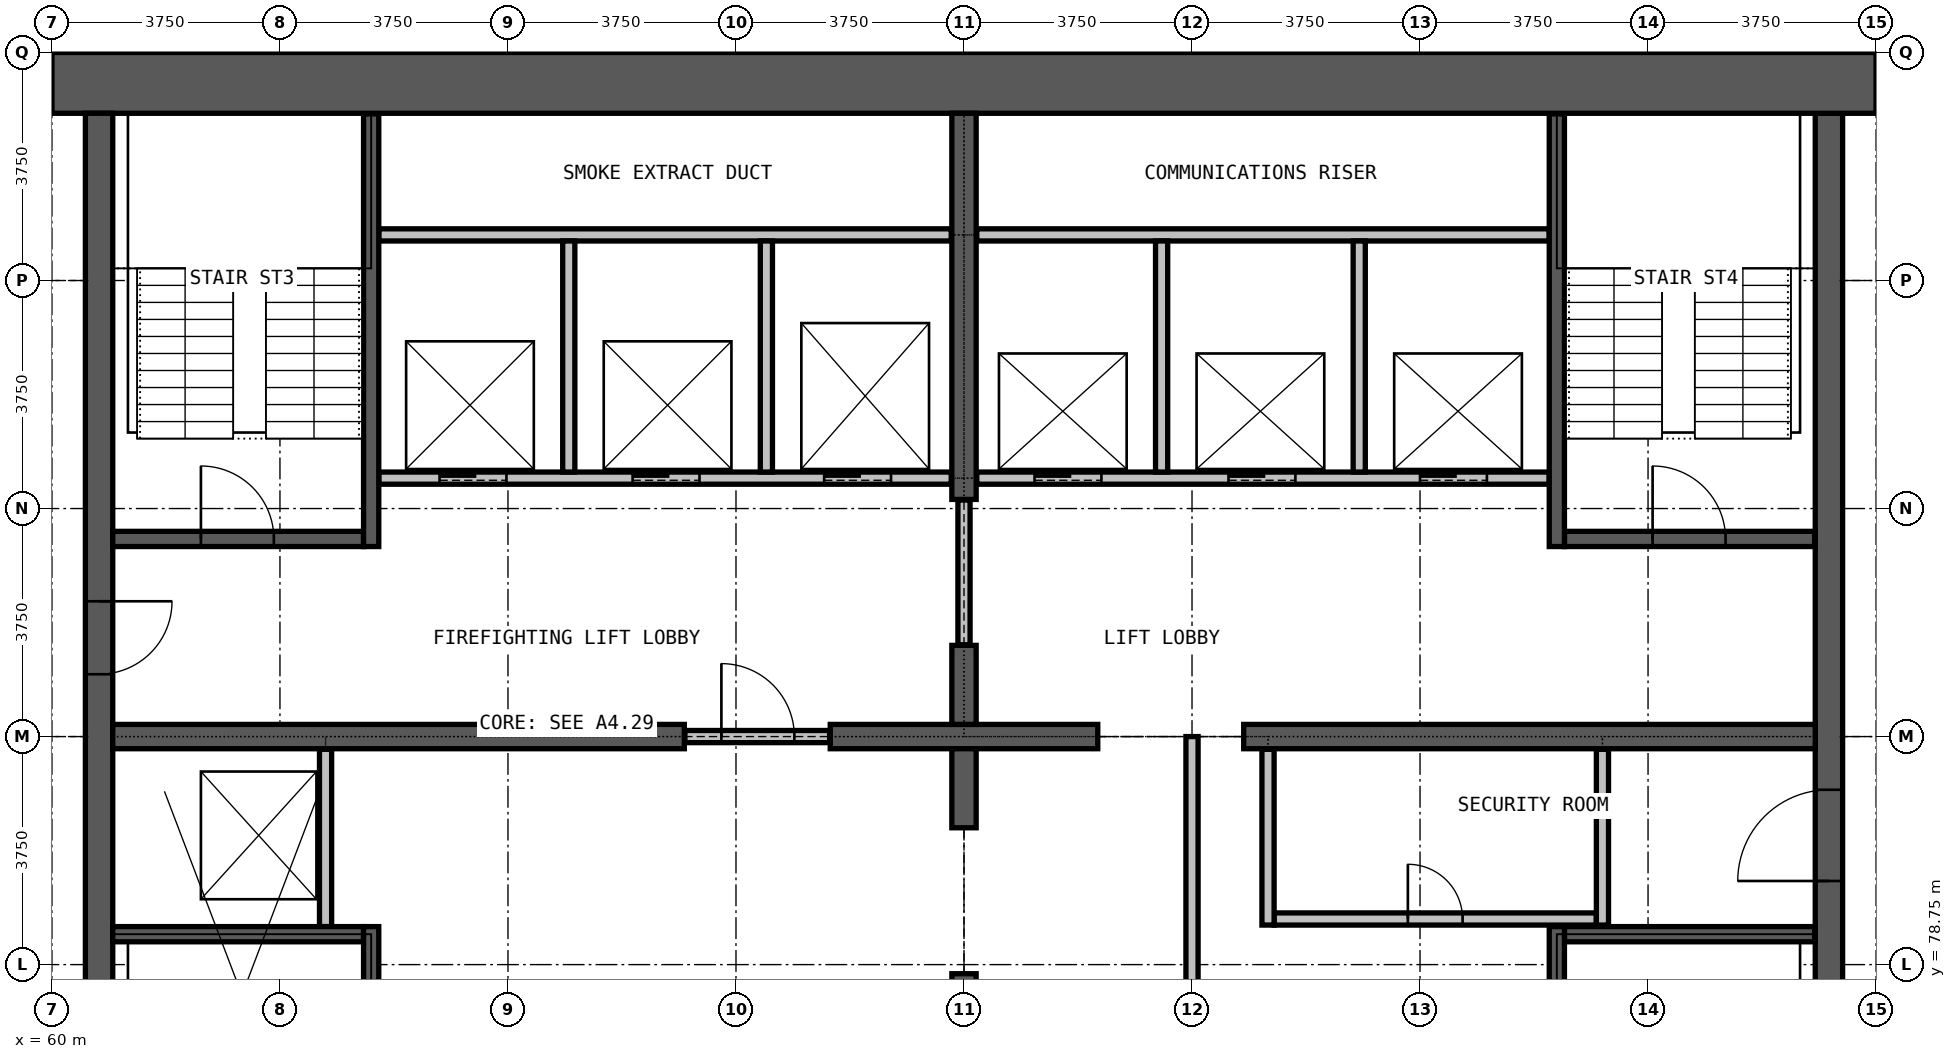
"""IFC4 building model, lengths in metres.
Left out: names, types, materials, properties, quantities, classifications, styles, units other than length and angle.
Written with IfcOpenShell. Run it as: python <this file> out.ifc"""

import sys

from ifc_helpers import new_model, si_unit, direction, frame, frame_2d, origin, place, context, subcontext, project, spatial, rectangle, extrude, element, fill, save


model = new_model("IFC4")
c1 = context("Model", 3, precision=1e-05, world=origin(), true_north=direction((0.0, 1.0)))
c2 = subcontext(c1, "Body", "Model", "MODEL_VIEW")
j1 = project(units=[si_unit("LENGTHUNIT", "METRE"), si_unit("PLANEANGLEUNIT", "RADIAN")], contexts=[c1])
p1 = place(None, origin())
s1 = spatial("IfcSite", under=j1, at=p1, CompositionType="ELEMENT")
p2 = place(p1, origin())
s2 = spatial("IfcBuilding", under=s1, at=p2, CompositionType="ELEMENT")
p3 = place(p2, frame((0.0, 0.0, 272.9)))
s3 = spatial("IfcBuildingStorey", under=s2, at=p3, CompositionType="ELEMENT", Elevation=272.9)
p4 = place(p3, frame((89.225, 72.25, 0.0), z_axis=(0.0, 0.0, 1.0), x_axis=(0.0, 1.0, 0.0)))
e1 = element("IfcWall", 1, at=p4, inside=s3, PredefinedType="SHEAR", context=c2, shape_type="SweptSolid", body=[
    extrude(rectangle(XDim=20.5, YDim=0.45, at=frame_2d((10.25, 0.0))), origin(), (0.0, 0.0, 1.0), 3.6),
])
p5 = place(p4, frame((7.875, 0.0, 0.0)))
e2 = element("IfcOpeningElement", 2, at=p5, cuts=e1, PredefinedType="OPENING", context=c2, shape_type="SweptSolid", body=[
    extrude(rectangle(XDim=1.5, YDim=2.2, at=frame_2d((0.75, 1.1))), frame((0.0, 0.235, 0.0), z_axis=(0.0, -1.0, 0.0), x_axis=(1.0, 0.0, 0.0)), (0.0, 0.0, 1.0), 0.47),
])
p6 = place(p3, frame((90.0, 93.25, 0.0), z_axis=(0.0, 0.0, 1.0), x_axis=(-1.0, 0.0, 0.0)))
e3 = element("IfcWall", 3, at=p6, inside=s3, PredefinedType="SHEAR", context=c2, shape_type="SweptSolid", body=[
    extrude(rectangle(XDim=30.0, YDim=1.0, at=frame_2d((15.0, 0.0))), origin(), (0.0, 0.0, 1.0), 3.6),
])
p7 = place(p3, frame((60.775, 92.75, 0.0), z_axis=(0.0, 0.0, 1.0), x_axis=(0.0, -1.0, 0.0)))
e4 = element("IfcWall", 4, at=p7, inside=s3, PredefinedType="SHEAR", context=c2, shape_type="SweptSolid", body=[
    extrude(rectangle(XDim=20.5, YDim=0.45, at=frame_2d((10.25, 0.0))), origin(), (0.0, 0.0, 1.0), 3.6),
])
p8 = place(p7, frame((8.025, 0.0, 0.0)))
e5 = element("IfcOpeningElement", 5, at=p8, cuts=e4, PredefinedType="OPENING", context=c2, shape_type="SweptSolid", body=[
    extrude(rectangle(XDim=1.2, YDim=2.2, at=frame_2d((0.6, 1.1))), frame((0.0, 0.235, 0.0), z_axis=(0.0, -1.0, 0.0), x_axis=(1.0, 0.0, 0.0)), (0.0, 0.0, 1.0), 0.47),
])
p9 = place(p3, frame((61.0, 82.5, 0.0), z_axis=(0.0, 0.0, 1.0), x_axis=(1.0, 0.0, 0.0)))
e6 = element("IfcWall", 6, at=p9, inside=s3, PredefinedType="SHEAR", context=c2, shape_type="SweptSolid", body=[
    extrude(rectangle(XDim=9.4, YDim=0.4, at=frame_2d((4.7, 0.0))), origin(), (0.0, 0.0, 1.0), 3.6),
])
p10 = place(p3, frame((72.8, 82.5, 0.0), z_axis=(0.0, 0.0, 1.0), x_axis=(1.0, 0.0, 0.0)))
e7 = element("IfcWall", 7, at=p10, inside=s3, PredefinedType="SHEAR", context=c2, shape_type="SweptSolid", body=[
    extrude(rectangle(XDim=4.4, YDim=0.4, at=frame_2d((2.2, 0.0))), origin(), (0.0, 0.0, 1.0), 3.6),
])
p11 = place(p3, frame((79.6, 82.5, 0.0), z_axis=(0.0, 0.0, 1.0), x_axis=(1.0, 0.0, 0.0)))
e8 = element("IfcWall", 8, at=p11, inside=s3, PredefinedType="SHEAR", context=c2, shape_type="SweptSolid", body=[
    extrude(rectangle(XDim=9.4, YDim=0.4, at=frame_2d((4.7, 0.0))), origin(), (0.0, 0.0, 1.0), 3.6),
])
p12 = place(p3, frame((75.0, 72.25, 0.0), z_axis=(0.0, 0.0, 1.0), x_axis=(0.0, 1.0, 0.0)))
e9 = element("IfcWall", 9, at=p12, inside=s3, PredefinedType="SHEAR", context=c2, shape_type="SweptSolid", body=[
    extrude(rectangle(XDim=6.35, YDim=0.4, at=frame_2d((3.175, 0.0))), origin(), (0.0, 0.0, 1.0), 3.6),
])
for number, where, z_axis, x_axis in (
    (10, (75.0, 81.0, 0.0), (0.0, 0.0, 1.0), (0.0, 1.0, 0.0)),
    (11, (75.0, 82.7, 0.0), (0.0, 0.0, 1.0), (0.0, 1.0, 0.0)),
):
    element("IfcWall", number, at=place(p3, frame(where, z_axis=z_axis, x_axis=x_axis)), inside=s3, PredefinedType="SHEAR", context=c2, shape_type="SweptSolid", body=[
        extrude(rectangle(XDim=1.3, YDim=0.4, at=frame_2d((0.65, 0.0))), origin(), (0.0, 0.0, 1.0), 3.6),
    ])
p13 = place(p3, frame((75.0, 86.4, 0.0), z_axis=(0.0, 0.0, 1.0), x_axis=(0.0, 1.0, 0.0)))
e12 = element("IfcWall", 12, at=p13, inside=s3, PredefinedType="SHEAR", context=c2, shape_type="SweptSolid", body=[
    extrude(rectangle(XDim=6.35, YDim=0.4, at=frame_2d((3.175, 0.0))), origin(), (0.0, 0.0, 1.0), 3.6),
])
p14 = place(p3, frame((80.1, 79.5, 0.0), z_axis=(0.0, 0.0, 1.0), x_axis=(1.0, 0.0, 0.0)))
e13 = element("IfcWall", 13, at=p14, inside=s3, PredefinedType="PARTITIONING", context=c2, shape_type="SweptSolid", body=[
    extrude(rectangle(XDim=5.3, YDim=0.2, at=frame_2d((2.65, 0.0))), origin(), (0.0, 0.0, 1.0), 3.3),
])
p15 = place(p14, frame((2.2, 0.0, 0.0)))
e14 = element("IfcOpeningElement", 14, at=p15, cuts=e13, PredefinedType="OPENING", context=c2, shape_type="SweptSolid", body=[
    extrude(rectangle(XDim=0.9, YDim=2.2, at=frame_2d((0.45, 1.1))), frame((0.0, 0.11, 0.0), z_axis=(0.0, -1.0, 0.0), x_axis=(1.0, 0.0, 0.0)), (0.0, 0.0, 1.0), 0.22),
])
p16 = place(p3, frame((70.41, 82.5, 0.0), z_axis=(0.0, 0.0, 1.0), x_axis=(1.0, 0.0, 0.0)))
e15 = element("IfcWall", 15, at=p16, inside=s3, PredefinedType="PARTITIONING", context=c2, shape_type="SweptSolid", body=[
    extrude(rectangle(XDim=2.38, YDim=0.2, at=frame_2d((1.19, 0.0))), origin(), (0.0, 0.0, 1.0), 2.4),
])
p17 = place(p16, frame((0.6, 0.0, 0.0)))
e16 = element("IfcOpeningElement", 16, at=p17, cuts=e15, PredefinedType="OPENING", context=c2, shape_type="SweptSolid", body=[
    extrude(rectangle(XDim=1.2, YDim=2.2, at=frame_2d((0.6, 1.1))), frame((0.0, 0.11, 0.0), z_axis=(0.0, -1.0, 0.0), x_axis=(1.0, 0.0, 0.0)), (0.0, 0.0, 1.0), 0.22),
])
p18 = place(p3, frame((75.0, 84.01, 0.0), z_axis=(0.0, 0.0, 1.0), x_axis=(0.0, 1.0, 0.0)))
e17 = element("IfcWall", 17, at=p18, inside=s3, PredefinedType="PARTITIONING", context=c2, shape_type="SweptSolid", body=[
    extrude(rectangle(XDim=2.38, YDim=0.2, at=frame_2d((1.19, 0.0))), origin(), (0.0, 0.0, 1.0), 2.4),
])
p19 = place(p3, frame((78.75, 72.26, 0.0), z_axis=(0.0, 0.0, 1.0), x_axis=(0.0, 1.0, 0.0)))
e18 = element("IfcWall", 18, at=p19, inside=s3, PredefinedType="PARTITIONING", context=c2, shape_type="SweptSolid", body=[
    extrude(rectangle(XDim=10.24, YDim=0.2, at=frame_2d((5.12, 0.0))), origin(), (0.0, 0.0, 1.0), 3.3),
])
for number, where, z_axis, x_axis in (
    (19, (80.0, 79.4, 0.0), (0.0, 0.0, 1.0), (0.0, 1.0, 0.0)),
    (20, (85.5, 79.4, 0.0), (0.0, 0.0, 1.0), (0.0, 1.0, 0.0)),
):
    element("IfcWall", number, at=place(p3, frame(where, z_axis=z_axis, x_axis=x_axis)), inside=s3, PredefinedType="PARTITIONING", context=c2, shape_type="SweptSolid", body=[
        extrude(rectangle(XDim=2.89, YDim=0.2, at=frame_2d((1.445, 0.0))), origin(), (0.0, 0.0, 1.0), 3.3),
    ])
p20 = place(p3, frame((65.375, 86.75, 0.0), z_axis=(0.0, 0.0, 1.0), x_axis=(1.0, 0.0, 0.0)))
e21 = element("IfcWall", 21, at=p20, inside=s3, PredefinedType="PARTITIONING", context=c2, shape_type="SweptSolid", body=[
    extrude(rectangle(XDim=9.415, YDim=0.2, at=frame_2d((4.708, 0.0))), origin(), (0.0, 0.0, 1.0), 3.3),
])
p21 = place(p20, frame((1.0, 0.0, 0.0)))
e22 = element("IfcOpeningElement", 22, at=p21, cuts=e21, PredefinedType="OPENING", context=c2, shape_type="SweptSolid", body=[
    extrude(rectangle(XDim=1.1, YDim=2.2, at=frame_2d((0.55, 1.1))), frame((0.0, 0.11, 0.0), z_axis=(0.0, -1.0, 0.0), x_axis=(1.0, 0.0, 0.0)), (0.0, 0.0, 1.0), 0.22),
])
p22 = place(p20, frame((4.175, 0.0, 0.0)))
e23 = element("IfcOpeningElement", 23, at=p22, cuts=e21, PredefinedType="OPENING", context=c2, shape_type="SweptSolid", body=[
    extrude(rectangle(XDim=1.1, YDim=2.2, at=frame_2d((0.55, 1.1))), frame((0.0, 0.11, 0.0), z_axis=(0.0, -1.0, 0.0), x_axis=(1.0, 0.0, 0.0)), (0.0, 0.0, 1.0), 0.22),
])
p23 = place(p20, frame((7.325, 0.0, 0.0)))
e24 = element("IfcOpeningElement", 24, at=p23, cuts=e21, PredefinedType="OPENING", context=c2, shape_type="SweptSolid", body=[
    extrude(rectangle(XDim=1.1, YDim=2.2, at=frame_2d((0.55, 1.1))), frame((0.0, 0.11, 0.0), z_axis=(0.0, -1.0, 0.0), x_axis=(1.0, 0.0, 0.0)), (0.0, 0.0, 1.0), 0.22),
])
p24 = place(p3, frame((75.21, 86.75, 0.0), z_axis=(0.0, 0.0, 1.0), x_axis=(1.0, 0.0, 0.0)))
e25 = element("IfcWall", 25, at=p24, inside=s3, PredefinedType="PARTITIONING", context=c2, shape_type="SweptSolid", body=[
    extrude(rectangle(XDim=9.415, YDim=0.2, at=frame_2d((4.708, 0.0))), origin(), (0.0, 0.0, 1.0), 3.3),
])
p25 = place(p24, frame((0.95, 0.0, 0.0)))
e26 = element("IfcOpeningElement", 26, at=p25, cuts=e25, PredefinedType="OPENING", context=c2, shape_type="SweptSolid", body=[
    extrude(rectangle(XDim=1.1, YDim=2.2, at=frame_2d((0.55, 1.1))), frame((0.0, 0.11, 0.0), z_axis=(0.0, -1.0, 0.0), x_axis=(1.0, 0.0, 0.0)), (0.0, 0.0, 1.0), 0.22),
])
p26 = place(p24, frame((4.14, 0.0, 0.0)))
e27 = element("IfcOpeningElement", 27, at=p26, cuts=e25, PredefinedType="OPENING", context=c2, shape_type="SweptSolid", body=[
    extrude(rectangle(XDim=1.1, YDim=2.2, at=frame_2d((0.55, 1.1))), frame((0.0, 0.11, 0.0), z_axis=(0.0, -1.0, 0.0), x_axis=(1.0, 0.0, 0.0)), (0.0, 0.0, 1.0), 0.22),
])
p27 = place(p24, frame((7.29, 0.0, 0.0)))
e28 = element("IfcOpeningElement", 28, at=p27, cuts=e25, PredefinedType="OPENING", context=c2, shape_type="SweptSolid", body=[
    extrude(rectangle(XDim=1.1, YDim=2.2, at=frame_2d((0.55, 1.1))), frame((0.0, 0.11, 0.0), z_axis=(0.0, -1.0, 0.0), x_axis=(1.0, 0.0, 0.0)), (0.0, 0.0, 1.0), 0.22),
])
for number, where, z_axis, x_axis in (
    (29, (65.375, 90.75, 0.0), (0.0, 0.0, 1.0), (1.0, 0.0, 0.0)),
    (30, (75.21, 90.75, 0.0), (0.0, 0.0, 1.0), (1.0, 0.0, 0.0)),
):
    element("IfcWall", number, at=place(p3, frame(where, z_axis=z_axis, x_axis=x_axis)), inside=s3, PredefinedType="PARTITIONING", context=c2, shape_type="SweptSolid", body=[
        extrude(rectangle(XDim=9.415, YDim=0.2, at=frame_2d((4.708, 0.0))), origin(), (0.0, 0.0, 1.0), 3.3),
    ])
p28 = place(p3, frame((64.5, 79.375, 0.0), z_axis=(0.0, 0.0, 1.0), x_axis=(0.0, 1.0, 0.0)))
e31 = element("IfcWall", 31, at=p28, inside=s3, PredefinedType="PARTITIONING", context=c2, shape_type="SweptSolid", body=[
    extrude(rectangle(XDim=2.915, YDim=0.2, at=frame_2d((1.458, 0.0))), origin(), (0.0, 0.0, 1.0), 3.3),
])
for number, where, z_axis, x_axis in (
    (32, (68.5, 86.85, 0.0), (0.0, 0.0, 1.0), (0.0, 1.0, 0.0)),
    (33, (71.75, 86.85, 0.0), (0.0, 0.0, 1.0), (0.0, 1.0, 0.0)),
    (34, (78.25, 86.85, 0.0), (0.0, 0.0, 1.0), (0.0, 1.0, 0.0)),
    (35, (81.5, 86.85, 0.0), (0.0, 0.0, 1.0), (0.0, 1.0, 0.0)),
):
    element("IfcWall", number, at=place(p3, frame(where, z_axis=z_axis, x_axis=x_axis)), inside=s3, PredefinedType="PARTITIONING", context=c2, shape_type="SweptSolid", body=[
        extrude(rectangle(XDim=3.8, YDim=0.2, at=frame_2d((1.9, 0.0))), origin(), (0.0, 0.0, 1.0), 3.3),
    ])
p29 = place(p3, frame((61.0, 79.25, 0.0), z_axis=(0.0, 0.0, 1.0), x_axis=(1.0, 0.0, 0.0)))
e36 = element("IfcWall", 36, at=p29, inside=s3, PredefinedType="PARTITIONING", context=c2, shape_type="SweptSolid", body=[
    extrude(rectangle(XDim=4.125, YDim=0.25, at=frame_2d((2.062, 0.0))), origin(), (0.0, 0.0, 1.0), 3.3),
])
p30 = place(p3, frame((84.875, 79.25, 0.0), z_axis=(0.0, 0.0, 1.0), x_axis=(1.0, 0.0, 0.0)))
e37 = element("IfcWall", 37, at=p30, inside=s3, PredefinedType="PARTITIONING", context=c2, shape_type="SweptSolid", body=[
    extrude(rectangle(XDim=4.115, YDim=0.25, at=frame_2d((2.058, 0.0))), origin(), (0.0, 0.0, 1.0), 3.3),
])
p31 = place(p3, frame((61.0, 85.75, 0.0), z_axis=(0.0, 0.0, 1.0), x_axis=(1.0, 0.0, 0.0)))
e38 = element("IfcWall", 38, at=p31, inside=s3, PredefinedType="PARTITIONING", context=c2, shape_type="SweptSolid", body=[
    extrude(rectangle(XDim=4.125, YDim=0.25, at=frame_2d((2.062, 0.0))), origin(), (0.0, 0.0, 1.0), 3.3),
])
p32 = place(p31, frame((1.45, 0.0, 0.0)))
e39 = element("IfcOpeningElement", 39, at=p32, cuts=e38, PredefinedType="OPENING", context=c2, shape_type="SweptSolid", body=[
    extrude(rectangle(XDim=1.2, YDim=2.2, at=frame_2d((0.6, 1.1))), frame((0.0, 0.135, 0.0), z_axis=(0.0, -1.0, 0.0), x_axis=(1.0, 0.0, 0.0)), (0.0, 0.0, 1.0), 0.27),
])
p33 = place(p3, frame((84.875, 85.75, 0.0), z_axis=(0.0, 0.0, 1.0), x_axis=(1.0, 0.0, 0.0)))
e40 = element("IfcWall", 40, at=p33, inside=s3, PredefinedType="PARTITIONING", context=c2, shape_type="SweptSolid", body=[
    extrude(rectangle(XDim=4.115, YDim=0.25, at=frame_2d((2.058, 0.0))), origin(), (0.0, 0.0, 1.0), 3.3),
])
p34 = place(p33, frame((1.45, 0.0, 0.0)))
e41 = element("IfcOpeningElement", 41, at=p34, cuts=e40, PredefinedType="OPENING", context=c2, shape_type="SweptSolid", body=[
    extrude(rectangle(XDim=1.2, YDim=2.2, at=frame_2d((0.6, 1.1))), frame((0.0, 0.135, 0.0), z_axis=(0.0, -1.0, 0.0), x_axis=(1.0, 0.0, 0.0)), (0.0, 0.0, 1.0), 0.27),
])
p35 = place(p3, frame((65.25, 78.26, 0.0), z_axis=(0.0, 0.0, 1.0), x_axis=(0.0, 1.0, 0.0)))
e42 = element("IfcWall", 42, at=p35, inside=s3, PredefinedType="PARTITIONING", context=c2, shape_type="SweptSolid", body=[
    extrude(rectangle(XDim=1.115, YDim=0.25, at=frame_2d((0.558, 0.0))), origin(), (0.0, 0.0, 1.0), 3.3),
])
p36 = place(p3, frame((65.25, 85.625, 0.0), z_axis=(0.0, 0.0, 1.0), x_axis=(0.0, 1.0, 0.0)))
e43 = element("IfcWall", 43, at=p36, inside=s3, PredefinedType="PARTITIONING", context=c2, shape_type="SweptSolid", body=[
    extrude(rectangle(XDim=7.115, YDim=0.25, at=frame_2d((3.558, 0.0))), origin(), (0.0, 0.0, 1.0), 3.3),
])
p37 = place(p3, frame((84.75, 78.26, 0.0), z_axis=(0.0, 0.0, 1.0), x_axis=(0.0, 1.0, 0.0)))
e44 = element("IfcWall", 44, at=p37, inside=s3, PredefinedType="PARTITIONING", context=c2, shape_type="SweptSolid", body=[
    extrude(rectangle(XDim=1.115, YDim=0.25, at=frame_2d((0.558, 0.0))), origin(), (0.0, 0.0, 1.0), 3.3),
])
p38 = place(p3, frame((84.75, 85.625, 0.0), z_axis=(0.0, 0.0, 1.0), x_axis=(0.0, 1.0, 0.0)))
e45 = element("IfcWall", 45, at=p38, inside=s3, PredefinedType="PARTITIONING", context=c2, shape_type="SweptSolid", body=[
    extrude(rectangle(XDim=7.115, YDim=0.25, at=frame_2d((3.558, 0.0))), origin(), (0.0, 0.0, 1.0), 3.3),
])
p39 = place(p25, origin())
e46 = element("IfcDoor", 46, at=p39, inside=s3, OperationType="DOUBLE_DOOR_SLIDING", PredefinedType="DOOR", context=c2, shape_type="SweptSolid", body=[
    extrude(rectangle(XDim=1.1, YDim=2.2, at=frame_2d((0.55, 1.1))), frame((0.0, 0.025, 0.0), z_axis=(0.0, -1.0, 0.0), x_axis=(1.0, 0.0, 0.0)), (0.0, 0.0, 1.0), 0.05),
])
fill(e26, e46)
p40 = place(p26, origin())
e47 = element("IfcDoor", 47, at=p40, inside=s3, OperationType="DOUBLE_DOOR_SLIDING", PredefinedType="DOOR", context=c2, shape_type="SweptSolid", body=[
    extrude(rectangle(XDim=1.1, YDim=2.2, at=frame_2d((0.55, 1.1))), frame((0.0, 0.025, 0.0), z_axis=(0.0, -1.0, 0.0), x_axis=(1.0, 0.0, 0.0)), (0.0, 0.0, 1.0), 0.05),
])
fill(e27, e47)
p41 = place(p27, origin())
e48 = element("IfcDoor", 48, at=p41, inside=s3, OperationType="DOUBLE_DOOR_SLIDING", PredefinedType="DOOR", context=c2, shape_type="SweptSolid", body=[
    extrude(rectangle(XDim=1.1, YDim=2.2, at=frame_2d((0.55, 1.1))), frame((0.0, 0.025, 0.0), z_axis=(0.0, -1.0, 0.0), x_axis=(1.0, 0.0, 0.0)), (0.0, 0.0, 1.0), 0.05),
])
fill(e28, e48)
p42 = place(p21, origin())
e49 = element("IfcDoor", 49, at=p42, inside=s3, OperationType="DOUBLE_DOOR_SLIDING", PredefinedType="DOOR", context=c2, shape_type="SweptSolid", body=[
    extrude(rectangle(XDim=1.1, YDim=2.2, at=frame_2d((0.55, 1.1))), frame((0.0, 0.025, 0.0), z_axis=(0.0, -1.0, 0.0), x_axis=(1.0, 0.0, 0.0)), (0.0, 0.0, 1.0), 0.05),
])
fill(e22, e49)
p43 = place(p22, origin())
e50 = element("IfcDoor", 50, at=p43, inside=s3, OperationType="DOUBLE_DOOR_SLIDING", PredefinedType="DOOR", context=c2, shape_type="SweptSolid", body=[
    extrude(rectangle(XDim=1.1, YDim=2.2, at=frame_2d((0.55, 1.1))), frame((0.0, 0.025, 0.0), z_axis=(0.0, -1.0, 0.0), x_axis=(1.0, 0.0, 0.0)), (0.0, 0.0, 1.0), 0.05),
])
fill(e23, e50)
p44 = place(p23, origin())
e51 = element("IfcDoor", 51, at=p44, inside=s3, OperationType="DOUBLE_DOOR_SLIDING", PredefinedType="DOOR", context=c2, shape_type="SweptSolid", body=[
    extrude(rectangle(XDim=1.1, YDim=2.2, at=frame_2d((0.55, 1.1))), frame((0.0, 0.025, 0.0), z_axis=(0.0, -1.0, 0.0), x_axis=(1.0, 0.0, 0.0)), (0.0, 0.0, 1.0), 0.05),
])
fill(e24, e51)
p45 = place(p17, origin())
e52 = element("IfcDoor", 52, at=p45, inside=s3, OperationType="SINGLE_SWING_LEFT", PredefinedType="DOOR", context=c2, shape_type="SweptSolid", body=[
    extrude(rectangle(XDim=1.2, YDim=2.2, at=frame_2d((0.6, 1.1))), frame((0.0, 0.025, 0.0), z_axis=(0.0, -1.0, 0.0), x_axis=(1.0, 0.0, 0.0)), (0.0, 0.0, 1.0), 0.05),
])
fill(e16, e52)
p46 = place(p32, origin())
e53 = element("IfcDoor", 53, at=p46, inside=s3, OperationType="SINGLE_SWING_RIGHT", PredefinedType="DOOR", context=c2, shape_type="SweptSolid", body=[
    extrude(rectangle(XDim=1.2, YDim=2.2, at=frame_2d((0.6, 1.1))), frame((0.0, 0.025, 0.0), z_axis=(0.0, -1.0, 0.0), x_axis=(1.0, 0.0, 0.0)), (0.0, 0.0, 1.0), 0.05),
])
fill(e39, e53)
p47 = place(p34, origin())
e54 = element("IfcDoor", 54, at=p47, inside=s3, OperationType="SINGLE_SWING_LEFT", PredefinedType="DOOR", context=c2, shape_type="SweptSolid", body=[
    extrude(rectangle(XDim=1.2, YDim=2.2, at=frame_2d((0.6, 1.1))), frame((0.0, 0.025, 0.0), z_axis=(0.0, -1.0, 0.0), x_axis=(1.0, 0.0, 0.0)), (0.0, 0.0, 1.0), 0.05),
])
fill(e41, e54)
p48 = place(p5, origin())
e55 = element("IfcDoor", 55, at=p48, inside=s3, OperationType="DOUBLE_DOOR_SINGLE_SWING", PredefinedType="DOOR", context=c2, shape_type="SweptSolid", body=[
    extrude(rectangle(XDim=1.5, YDim=2.2, at=frame_2d((0.75, 1.1))), frame((0.0, 0.025, 0.0), z_axis=(0.0, -1.0, 0.0), x_axis=(1.0, 0.0, 0.0)), (0.0, 0.0, 1.0), 0.05),
])
fill(e2, e55)
p49 = place(p15, origin())
e56 = element("IfcDoor", 56, at=p49, inside=s3, OperationType="SINGLE_SWING_LEFT", PredefinedType="DOOR", context=c2, shape_type="SweptSolid", body=[
    extrude(rectangle(XDim=0.9, YDim=2.2, at=frame_2d((0.45, 1.1))), frame((0.0, 0.025, 0.0), z_axis=(0.0, -1.0, 0.0), x_axis=(1.0, 0.0, 0.0)), (0.0, 0.0, 1.0), 0.05),
])
fill(e14, e56)
p50 = place(p8, origin())
e57 = element("IfcDoor", 57, at=p50, inside=s3, OperationType="SINGLE_SWING_LEFT", PredefinedType="DOOR", context=c2, shape_type="SweptSolid", body=[
    extrude(rectangle(XDim=1.2, YDim=2.2, at=frame_2d((0.6, 1.1))), frame((0.0, 0.025, 0.0), z_axis=(0.0, -1.0, 0.0), x_axis=(1.0, 0.0, 0.0)), (0.0, 0.0, 1.0), 0.05),
])
fill(e5, e57)
save(model, sys.argv[1])
